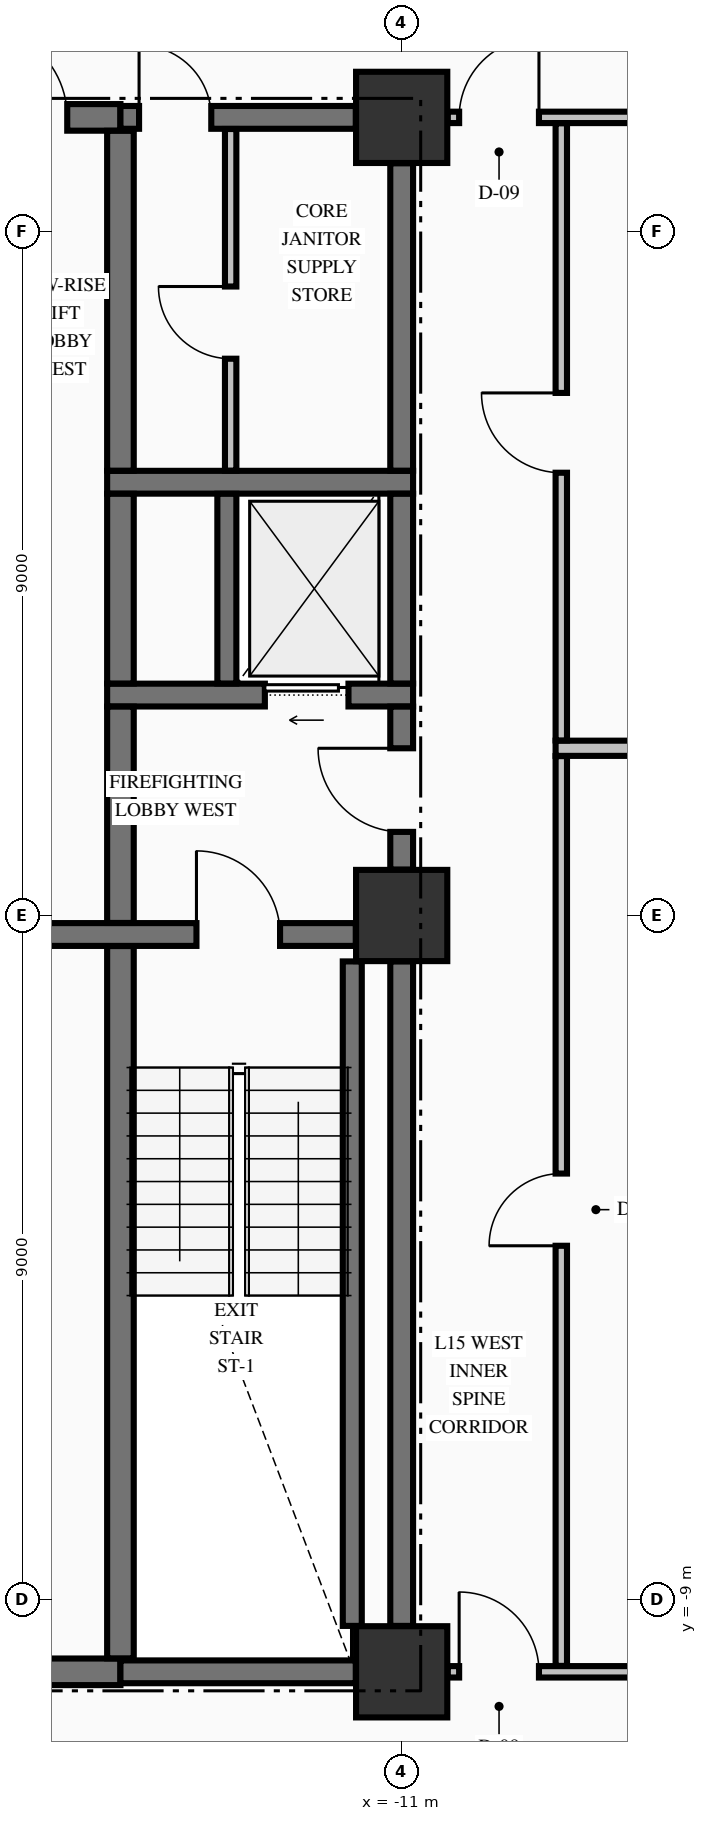
"""IFC4 building model, lengths in metres.
Left out: names, types, materials, properties, quantities, classifications, styles, units other than length and angle.
Written with IfcOpenShell. Run it as: python <this file> out.ifc"""

import sys

from ifc_helpers import new_model, si_unit, direction, frame, frame_2d, origin, origin_2d, place, context, subcontext, project, spatial, rectangle, extrude, element, fill, save


model = new_model("IFC4")
c1 = context("Model", 3, precision=1e-05, world=origin(), true_north=direction((0.0, 1.0)))
c2 = subcontext(c1, "Body", "Model", "MODEL_VIEW")
j1 = project(units=[si_unit("LENGTHUNIT", "METRE"), si_unit("PLANEANGLEUNIT", "RADIAN")], contexts=[c1])
p1 = place(None, origin())
s1 = spatial("IfcSite", under=j1, at=p1, CompositionType="ELEMENT")
p2 = place(p1, origin())
s2 = spatial("IfcBuilding", under=s1, at=p2, CompositionType="ELEMENT")
p3 = place(p2, frame((0.0, 0.0, 64.33)))
s3 = spatial("IfcBuildingStorey", under=s2, at=p3, CompositionType="ELEMENT", Elevation=64.33)
for number, where, z_axis, x_axis in (
    (1, (-11.0, -9.95, -0.25), (0.0, 0.0, 1.0), (1.0, 0.0, 0.0)),
    (2, (-11.0, 0.0, -0.25), (0.0, 0.0, 1.0), (1.0, 0.0, 0.0)),
    (3, (-11.0, 10.5, -0.25), (0.0, 0.0, 1.0), (1.0, 0.0, 0.0)),
):
    element("IfcColumn", number, at=place(p3, frame(where, z_axis=z_axis, x_axis=x_axis)), inside=s3, PredefinedType="COLUMN", context=c2, shape_type="SweptSolid", body=[
        extrude(rectangle(XDim=1.2, YDim=1.2, at=origin_2d()), origin(), (0.0, 0.0, 1.0), 3.57),
    ])
p4 = place(p3, frame((-19.396, -9.95, 0.0), z_axis=(0.0, 0.0, 1.0), x_axis=(1.0, 0.0, 0.0)))
e4 = element("IfcWall", 4, at=p4, inside=s3, PredefinedType="SHEAR", context=c2, shape_type="SweptSolid", body=[
    extrude(rectangle(XDim=4.696, YDim=0.35, at=frame_2d((2.348, 0.0))), origin(), (0.0, 0.0, 1.0), 3.32),
])
p5 = place(p4, frame((0.571, 0.0, 0.0)))
e5 = element("IfcOpeningElement", 5, at=p5, cuts=e4, PredefinedType="OPENING", context=c2, shape_type="SweptSolid", body=[
    extrude(rectangle(XDim=1.05, YDim=2.15, at=frame_2d((0.525, 1.075))), frame((0.0, 0.185, 0.0), z_axis=(0.0, -1.0, 0.0), x_axis=(1.0, 0.0, 0.0)), (0.0, 0.0, 1.0), 0.37),
])
p6 = place(p3, frame((-14.7, -9.95, 0.0), z_axis=(0.0, 0.0, 1.0), x_axis=(1.0, 0.0, 0.0)))
e6 = element("IfcWall", 6, at=p6, inside=s3, PredefinedType="SHEAR", context=c2, shape_type="SweptSolid", body=[
    extrude(rectangle(XDim=3.096, YDim=0.3, at=frame_2d((1.548, 0.0))), origin(), (0.0, 0.0, 1.0), 3.32),
])
p7 = place(p3, frame((-19.396, -0.25, 0.0), z_axis=(0.0, 0.0, 1.0), x_axis=(1.0, 0.0, 0.0)))
e7 = element("IfcWall", 7, at=p7, inside=s3, PredefinedType="SHEAR", context=c2, shape_type="SweptSolid", body=[
    extrude(rectangle(XDim=7.792, YDim=0.3, at=frame_2d((3.896, 0.0))), origin(), (0.0, 0.0, 1.0), 3.32),
])
p8 = place(p7, frame((5.696, 0.0, 0.0)))
e8 = element("IfcOpeningElement", 8, at=p8, cuts=e7, PredefinedType="OPENING", context=c2, shape_type="SweptSolid", body=[
    extrude(rectangle(XDim=1.1, YDim=2.15, at=frame_2d((0.55, 1.075))), frame((0.0, 0.16, 0.0), z_axis=(0.0, -1.0, 0.0), x_axis=(1.0, 0.0, 0.0)), (0.0, 0.0, 1.0), 0.32),
])
p9 = place(p3, frame((-14.875, 2.9, 0.0), z_axis=(0.0, 0.0, 1.0), x_axis=(1.0, 0.0, 0.0)))
e9 = element("IfcWall", 9, at=p9, inside=s3, PredefinedType="SHEAR", context=c2, shape_type="SweptSolid", body=[
    extrude(rectangle(XDim=4.025, YDim=0.3, at=frame_2d((2.012, 0.0))), origin(), (0.0, 0.0, 1.0), 3.32),
])
p10 = place(p9, frame((2.075, 0.0, 0.0)))
e10 = element("IfcOpeningElement", 10, at=p10, cuts=e9, PredefinedType="OPENING", context=c2, shape_type="SweptSolid", body=[
    extrude(rectangle(XDim=1.1, YDim=2.2, at=frame_2d((0.55, 1.1))), frame((0.0, 0.16, 0.0), z_axis=(0.0, -1.0, 0.0), x_axis=(1.0, 0.0, 0.0)), (0.0, 0.0, 1.0), 0.32),
])
p11 = place(p3, frame((-14.875, 5.7, 0.0), z_axis=(0.0, 0.0, 1.0), x_axis=(1.0, 0.0, 0.0)))
e11 = element("IfcWall", 11, at=p11, inside=s3, PredefinedType="SHEAR", context=c2, shape_type="SweptSolid", body=[
    extrude(rectangle(XDim=4.025, YDim=0.3, at=frame_2d((2.012, 0.0))), origin(), (0.0, 0.0, 1.0), 3.32),
])
p12 = place(p3, frame((-19.396, 10.5, 0.0), z_axis=(0.0, 0.0, 1.0), x_axis=(1.0, 0.0, 0.0)))
e12 = element("IfcWall", 12, at=p12, inside=s3, PredefinedType="SHEAR", context=c2, shape_type="SweptSolid", body=[
    extrude(rectangle(XDim=4.696, YDim=0.35, at=frame_2d((2.348, 0.0))), origin(), (0.0, 0.0, 1.0), 3.32),
])
p13 = place(p12, frame((2.796, 0.0, 0.0)))
e13 = element("IfcOpeningElement", 13, at=p13, cuts=e12, PredefinedType="OPENING", context=c2, shape_type="SweptSolid", body=[
    extrude(rectangle(XDim=1.2, YDim=2.15, at=frame_2d((0.6, 1.075))), frame((0.0, 0.185, 0.0), z_axis=(0.0, -1.0, 0.0), x_axis=(1.0, 0.0, 0.0)), (0.0, 0.0, 1.0), 0.37),
])
p14 = place(p3, frame((-14.7, 10.5, 0.0), z_axis=(0.0, 0.0, 1.0), x_axis=(1.0, 0.0, 0.0)))
e14 = element("IfcWall", 14, at=p14, inside=s3, PredefinedType="SHEAR", context=c2, shape_type="SweptSolid", body=[
    extrude(rectangle(XDim=3.096, YDim=0.3, at=frame_2d((1.548, 0.0))), origin(), (0.0, 0.0, 1.0), 3.32),
])
p15 = place(p14, frame((0.245, 0.0, 0.0)))
e15 = element("IfcOpeningElement", 15, at=p15, cuts=e14, PredefinedType="OPENING", context=c2, shape_type="SweptSolid", body=[
    extrude(rectangle(XDim=0.95, YDim=2.15, at=frame_2d((0.475, 1.075))), frame((0.0, 0.16, 0.0), z_axis=(0.0, -1.0, 0.0), x_axis=(1.0, 0.0, 0.0)), (0.0, 0.0, 1.0), 0.32),
])
p16 = place(p3, frame((-10.394, -9.95, 0.0), z_axis=(0.0, 0.0, 1.0), x_axis=(1.0, 0.0, 0.0)))
e16 = element("IfcWall", 16, at=p16, inside=s3, PredefinedType="PARTITIONING", context=c2, shape_type="SweptSolid", body=[
    extrude(rectangle(XDim=20.788, YDim=0.15, at=frame_2d((10.394, 0.0))), origin(), (0.0, 0.0, 1.0), 3.32),
])
p17 = place(p16, frame((0.15, 0.0, 0.0)))
e17 = element("IfcOpeningElement", 17, at=p17, cuts=e16, PredefinedType="OPENING", context=c2, shape_type="SweptSolid", body=[
    extrude(rectangle(XDim=1.05, YDim=2.15, at=frame_2d((0.525, 1.075))), frame((0.0, 0.085, 0.0), z_axis=(0.0, -1.0, 0.0), x_axis=(1.0, 0.0, 0.0)), (0.0, 0.0, 1.0), 0.17),
])
p18 = place(p16, frame((19.588, 0.0, 0.0)))
e18 = element("IfcOpeningElement", 18, at=p18, cuts=e16, PredefinedType="OPENING", context=c2, shape_type="SweptSolid", body=[
    extrude(rectangle(XDim=1.05, YDim=2.15, at=frame_2d((0.525, 1.075))), frame((0.0, 0.085, 0.0), z_axis=(0.0, -1.0, 0.0), x_axis=(1.0, 0.0, 0.0)), (0.0, 0.0, 1.0), 0.17),
])
p19 = place(p16, frame((13.769, 0.0, 0.0)))
e19 = element("IfcOpeningElement", 19, at=p19, cuts=e16, PredefinedType="OPENING", context=c2, shape_type="SweptSolid", body=[
    extrude(rectangle(XDim=0.95, YDim=2.15, at=frame_2d((0.475, 1.075))), frame((0.0, 0.085, 0.0), z_axis=(0.0, -1.0, 0.0), x_axis=(1.0, 0.0, 0.0)), (0.0, 0.0, 1.0), 0.17),
])
p20 = place(p3, frame((-8.975, 2.2, 0.0), z_axis=(0.0, 0.0, 1.0), x_axis=(1.0, 0.0, 0.0)))
e20 = element("IfcWall", 20, at=p20, inside=s3, PredefinedType="PARTITIONING", context=c2, shape_type="SweptSolid", body=[
    extrude(rectangle(XDim=10.875, YDim=0.2, at=frame_2d((5.438, 0.0))), origin(), (0.0, 0.0, 1.0), 3.32),
])
p21 = place(p3, frame((-10.394, 10.5, 0.0), z_axis=(0.0, 0.0, 1.0), x_axis=(1.0, 0.0, 0.0)))
e21 = element("IfcWall", 21, at=p21, inside=s3, PredefinedType="PARTITIONING", context=c2, shape_type="SweptSolid", body=[
    extrude(rectangle(XDim=20.788, YDim=0.15, at=frame_2d((10.394, 0.0))), origin(), (0.0, 0.0, 1.0), 3.32),
])
p22 = place(p21, frame((0.15, 0.0, 0.0)))
e22 = element("IfcOpeningElement", 22, at=p22, cuts=e21, PredefinedType="OPENING", context=c2, shape_type="SweptSolid", body=[
    extrude(rectangle(XDim=1.05, YDim=2.15, at=frame_2d((0.525, 1.075))), frame((0.0, 0.085, 0.0), z_axis=(0.0, -1.0, 0.0), x_axis=(1.0, 0.0, 0.0)), (0.0, 0.0, 1.0), 0.17),
])
p23 = place(p21, frame((19.588, 0.0, 0.0)))
e23 = element("IfcOpeningElement", 23, at=p23, cuts=e21, PredefinedType="OPENING", context=c2, shape_type="SweptSolid", body=[
    extrude(rectangle(XDim=1.05, YDim=2.15, at=frame_2d((0.525, 1.075))), frame((0.0, 0.085, 0.0), z_axis=(0.0, -1.0, 0.0), x_axis=(1.0, 0.0, 0.0)), (0.0, 0.0, 1.0), 0.17),
])
p24 = place(p3, frame((-14.7, -9.773, 0.0), z_axis=(0.0, 0.0, 1.0), x_axis=(0.0, 1.0, 0.0)))
e24 = element("IfcWall", 24, at=p24, inside=s3, PredefinedType="SHEAR", context=c2, shape_type="SweptSolid", body=[
    extrude(rectangle(XDim=9.371, YDim=0.35, at=frame_2d((4.686, 0.0))), origin(), (0.0, 0.0, 1.0), 3.32),
])
p25 = place(p3, frame((-14.7, -0.098, 0.0), z_axis=(0.0, 0.0, 1.0), x_axis=(0.0, 1.0, 0.0)))
e25 = element("IfcWall", 25, at=p25, inside=s3, PredefinedType="SHEAR", context=c2, shape_type="SweptSolid", body=[
    extrude(rectangle(XDim=2.846, YDim=0.35, at=frame_2d((1.423, 0.0))), origin(), (0.0, 0.0, 1.0), 3.32),
])
p26 = place(p3, frame((-14.7, 3.052, 0.0), z_axis=(0.0, 0.0, 1.0), x_axis=(0.0, 1.0, 0.0)))
e26 = element("IfcWall", 26, at=p26, inside=s3, PredefinedType="SHEAR", context=c2, shape_type="SweptSolid", body=[
    extrude(rectangle(XDim=2.496, YDim=0.35, at=frame_2d((1.248, 0.0))), origin(), (0.0, 0.0, 1.0), 3.32),
])
p27 = place(p3, frame((-14.7, 5.852, 0.0), z_axis=(0.0, 0.0, 1.0), x_axis=(0.0, 1.0, 0.0)))
e27 = element("IfcWall", 27, at=p27, inside=s3, PredefinedType="SHEAR", context=c2, shape_type="SweptSolid", body=[
    extrude(rectangle(XDim=4.471, YDim=0.35, at=frame_2d((2.235, 0.0))), origin(), (0.0, 0.0, 1.0), 3.32),
])
p28 = place(p3, frame((-13.3, 3.052, 0.0), z_axis=(0.0, 0.0, 1.0), x_axis=(0.0, 1.0, 0.0)))
e28 = element("IfcWall", 28, at=p28, inside=s3, PredefinedType="SOLIDWALL", context=c2, shape_type="SweptSolid", body=[
    extrude(rectangle(XDim=2.496, YDim=0.25, at=frame_2d((1.248, 0.0))), origin(), (0.0, 0.0, 1.0), 3.32),
])
p29 = place(p3, frame((-11.65, -9.346, 0.0), z_axis=(0.0, 0.0, 1.0), x_axis=(0.0, 1.0, 0.0)))
e29 = element("IfcWall", 29, at=p29, inside=s3, PredefinedType="SOLIDWALL", context=c2, shape_type="SweptSolid", body=[
    extrude(rectangle(XDim=8.742, YDim=0.25, at=frame_2d((4.371, 0.0))), origin(), (0.0, 0.0, 1.0), 3.32),
])
p30 = place(p3, frame((-11.0, -9.346, 0.0), z_axis=(0.0, 0.0, 1.0), x_axis=(0.0, 1.0, 0.0)))
e30 = element("IfcWall", 30, at=p30, inside=s3, PredefinedType="SHEAR", context=c2, shape_type="SweptSolid", body=[
    extrude(rectangle(XDim=8.742, YDim=0.3, at=frame_2d((4.371, 0.0))), origin(), (0.0, 0.0, 1.0), 3.32),
])
p31 = place(p3, frame((-11.0, 0.604, 0.0), z_axis=(0.0, 0.0, 1.0), x_axis=(0.0, 1.0, 0.0)))
e31 = element("IfcWall", 31, at=p31, inside=s3, PredefinedType="SHEAR", context=c2, shape_type="SweptSolid", body=[
    extrude(rectangle(XDim=2.144, YDim=0.3, at=frame_2d((1.072, 0.0))), origin(), (0.0, 0.0, 1.0), 3.32),
])
p32 = place(p31, frame((0.496, 0.0, 0.0)))
e32 = element("IfcOpeningElement", 32, at=p32, cuts=e31, PredefinedType="OPENING", context=c2, shape_type="SweptSolid", body=[
    extrude(rectangle(XDim=1.1, YDim=2.15, at=frame_2d((0.55, 1.075))), frame((0.0, 0.16, 0.0), z_axis=(0.0, -1.0, 0.0), x_axis=(1.0, 0.0, 0.0)), (0.0, 0.0, 1.0), 0.32),
])
p33 = place(p3, frame((-11.0, 3.052, 0.0), z_axis=(0.0, 0.0, 1.0), x_axis=(0.0, 1.0, 0.0)))
e33 = element("IfcWall", 33, at=p33, inside=s3, PredefinedType="SHEAR", context=c2, shape_type="SweptSolid", body=[
    extrude(rectangle(XDim=2.496, YDim=0.3, at=frame_2d((1.248, 0.0))), origin(), (0.0, 0.0, 1.0), 3.32),
])
p34 = place(p3, frame((-11.0, 5.852, 0.0), z_axis=(0.0, 0.0, 1.0), x_axis=(0.0, 1.0, 0.0)))
e34 = element("IfcWall", 34, at=p34, inside=s3, PredefinedType="SHEAR", context=c2, shape_type="SweptSolid", body=[
    extrude(rectangle(XDim=4.044, YDim=0.3, at=frame_2d((2.022, 0.0))), origin(), (0.0, 0.0, 1.0), 3.32),
])
p35 = place(p3, frame((-13.25, 5.853, 0.0), z_axis=(0.0, 0.0, 1.0), x_axis=(0.0, 1.0, 0.0)))
e35 = element("IfcWall", 35, at=p35, inside=s3, PredefinedType="PARTITIONING", context=c2, shape_type="SweptSolid", body=[
    extrude(rectangle(XDim=4.494, YDim=0.15, at=frame_2d((2.247, 0.0))), origin(), (0.0, 0.0, 1.0), 3.32),
])
p36 = place(p35, frame((1.472, 0.0, 0.0)))
e36 = element("IfcOpeningElement", 36, at=p36, cuts=e35, PredefinedType="OPENING", context=c2, shape_type="SweptSolid", body=[
    extrude(rectangle(XDim=0.95, YDim=2.15, at=frame_2d((0.475, 1.075))), frame((0.0, 0.085, 0.0), z_axis=(0.0, -1.0, 0.0), x_axis=(1.0, 0.0, 0.0)), (0.0, 0.0, 1.0), 0.17),
])
p37 = place(p3, frame((-8.9, -9.872, 0.0), z_axis=(0.0, 0.0, 1.0), x_axis=(0.0, 1.0, 0.0)))
e37 = element("IfcWall", 37, at=p37, inside=s3, PredefinedType="PARTITIONING", context=c2, shape_type="SweptSolid", body=[
    extrude(rectangle(XDim=11.969, YDim=0.15, at=frame_2d((5.984, 0.0))), origin(), (0.0, 0.0, 1.0), 3.32),
])
p38 = place(p37, frame((5.527, 0.0, 0.0)))
e38 = element("IfcOpeningElement", 38, at=p38, cuts=e37, PredefinedType="OPENING", context=c2, shape_type="SweptSolid", body=[
    extrude(rectangle(XDim=0.95, YDim=2.15, at=frame_2d((0.475, 1.075))), frame((0.0, 0.085, 0.0), z_axis=(0.0, -1.0, 0.0), x_axis=(1.0, 0.0, 0.0)), (0.0, 0.0, 1.0), 0.17),
])
p39 = place(p3, frame((-8.9, 2.303, 0.0), z_axis=(0.0, 0.0, 1.0), x_axis=(0.0, 1.0, 0.0)))
e39 = element("IfcWall", 39, at=p39, inside=s3, PredefinedType="PARTITIONING", context=c2, shape_type="SweptSolid", body=[
    extrude(rectangle(XDim=8.119, YDim=0.15, at=frame_2d((4.06, 0.0))), origin(), (0.0, 0.0, 1.0), 3.32),
])
p40 = place(p39, frame((3.522, 0.0, 0.0)))
e40 = element("IfcOpeningElement", 40, at=p40, cuts=e39, PredefinedType="OPENING", context=c2, shape_type="SweptSolid", body=[
    extrude(rectangle(XDim=1.05, YDim=2.15, at=frame_2d((0.525, 1.075))), frame((0.0, 0.085, 0.0), z_axis=(0.0, -1.0, 0.0), x_axis=(1.0, 0.0, 0.0)), (0.0, 0.0, 1.0), 0.17),
])
p41 = place(p8, origin())
e41 = element("IfcDoor", 41, at=p41, inside=s3, OperationType="SINGLE_SWING_LEFT", PredefinedType="DOOR", context=c2, shape_type="SweptSolid", body=[
    extrude(rectangle(XDim=1.1, YDim=2.15, at=frame_2d((0.55, 1.075))), frame((0.0, 0.025, 0.0), z_axis=(0.0, -1.0, 0.0), x_axis=(1.0, 0.0, 0.0)), (0.0, 0.0, 1.0), 0.05),
])
fill(e8, e41)
p42 = place(p32, origin())
e42 = element("IfcDoor", 42, at=p42, inside=s3, OperationType="SINGLE_SWING_RIGHT", PredefinedType="DOOR", context=c2, shape_type="SweptSolid", body=[
    extrude(rectangle(XDim=1.1, YDim=2.15, at=frame_2d((0.55, 1.075))), frame((0.0, 0.025, 0.0), z_axis=(0.0, -1.0, 0.0), x_axis=(1.0, 0.0, 0.0)), (0.0, 0.0, 1.0), 0.05),
])
fill(e32, e42)
p43 = place(p10, origin())
e43 = element("IfcDoor", 43, at=p43, inside=s3, OperationType="SLIDING_TO_LEFT", PredefinedType="DOOR", context=c2, shape_type="SweptSolid", body=[
    extrude(rectangle(XDim=1.1, YDim=2.2, at=frame_2d((0.55, 1.1))), frame((0.0, 0.025, 0.0), z_axis=(0.0, -1.0, 0.0), x_axis=(1.0, 0.0, 0.0)), (0.0, 0.0, 1.0), 0.05),
])
fill(e10, e43)
p44 = place(p15, origin())
e44 = element("IfcDoor", 44, at=p44, inside=s3, OperationType="SINGLE_SWING_LEFT", PredefinedType="DOOR", context=c2, shape_type="SweptSolid", body=[
    extrude(rectangle(XDim=0.95, YDim=2.15, at=frame_2d((0.475, 1.075))), frame((0.0, 0.025, 0.0), z_axis=(0.0, -1.0, 0.0), x_axis=(1.0, 0.0, 0.0)), (0.0, 0.0, 1.0), 0.05),
])
fill(e15, e44)
p45 = place(p36, origin())
e45 = element("IfcDoor", 45, at=p45, inside=s3, OperationType="SINGLE_SWING_RIGHT", PredefinedType="DOOR", context=c2, shape_type="SweptSolid", body=[
    extrude(rectangle(XDim=0.95, YDim=2.15, at=frame_2d((0.475, 1.075))), frame((0.0, 0.025, 0.0), z_axis=(0.0, -1.0, 0.0), x_axis=(1.0, 0.0, 0.0)), (0.0, 0.0, 1.0), 0.05),
])
fill(e36, e45)
p46 = place(p13, origin())
e46 = element("IfcDoor", 46, at=p46, inside=s3, OperationType="SINGLE_SWING_LEFT", PredefinedType="DOOR", context=c2, shape_type="SweptSolid", body=[
    extrude(rectangle(XDim=1.2, YDim=2.15, at=frame_2d((0.6, 1.075))), frame((0.0, 0.025, 0.0), z_axis=(0.0, -1.0, 0.0), x_axis=(1.0, 0.0, 0.0)), (0.0, 0.0, 1.0), 0.05),
])
fill(e13, e46)
p47 = place(p22, origin())
e47 = element("IfcDoor", 47, at=p47, inside=s3, OperationType="SINGLE_SWING_RIGHT", PredefinedType="DOOR", context=c2, shape_type="SweptSolid", body=[
    extrude(rectangle(XDim=1.05, YDim=2.15, at=frame_2d((0.525, 1.075))), frame((0.0, 0.025, 0.0), z_axis=(0.0, -1.0, 0.0), x_axis=(1.0, 0.0, 0.0)), (0.0, 0.0, 1.0), 0.05),
])
fill(e22, e47)
p48 = place(p17, origin())
e48 = element("IfcDoor", 48, at=p48, inside=s3, OperationType="SINGLE_SWING_LEFT", PredefinedType="DOOR", context=c2, shape_type="SweptSolid", body=[
    extrude(rectangle(XDim=1.05, YDim=2.15, at=frame_2d((0.525, 1.075))), frame((0.0, 0.025, 0.0), z_axis=(0.0, -1.0, 0.0), x_axis=(1.0, 0.0, 0.0)), (0.0, 0.0, 1.0), 0.05),
])
fill(e17, e48)
p49 = place(p40, origin())
e49 = element("IfcDoor", 49, at=p49, inside=s3, OperationType="SINGLE_SWING_RIGHT", PredefinedType="DOOR", context=c2, shape_type="SweptSolid", body=[
    extrude(rectangle(XDim=1.05, YDim=2.15, at=frame_2d((0.525, 1.075))), frame((0.0, 0.025, 0.0), z_axis=(0.0, -1.0, 0.0), x_axis=(1.0, 0.0, 0.0)), (0.0, 0.0, 1.0), 0.05),
])
fill(e40, e49)
p50 = place(p38, origin())
e50 = element("IfcDoor", 50, at=p50, inside=s3, OperationType="SINGLE_SWING_LEFT", PredefinedType="DOOR", context=c2, shape_type="SweptSolid", body=[
    extrude(rectangle(XDim=0.95, YDim=2.15, at=frame_2d((0.475, 1.075))), frame((0.0, 0.025, 0.0), z_axis=(0.0, -1.0, 0.0), x_axis=(1.0, 0.0, 0.0)), (0.0, 0.0, 1.0), 0.05),
])
fill(e38, e50)
save(model, sys.argv[1])
